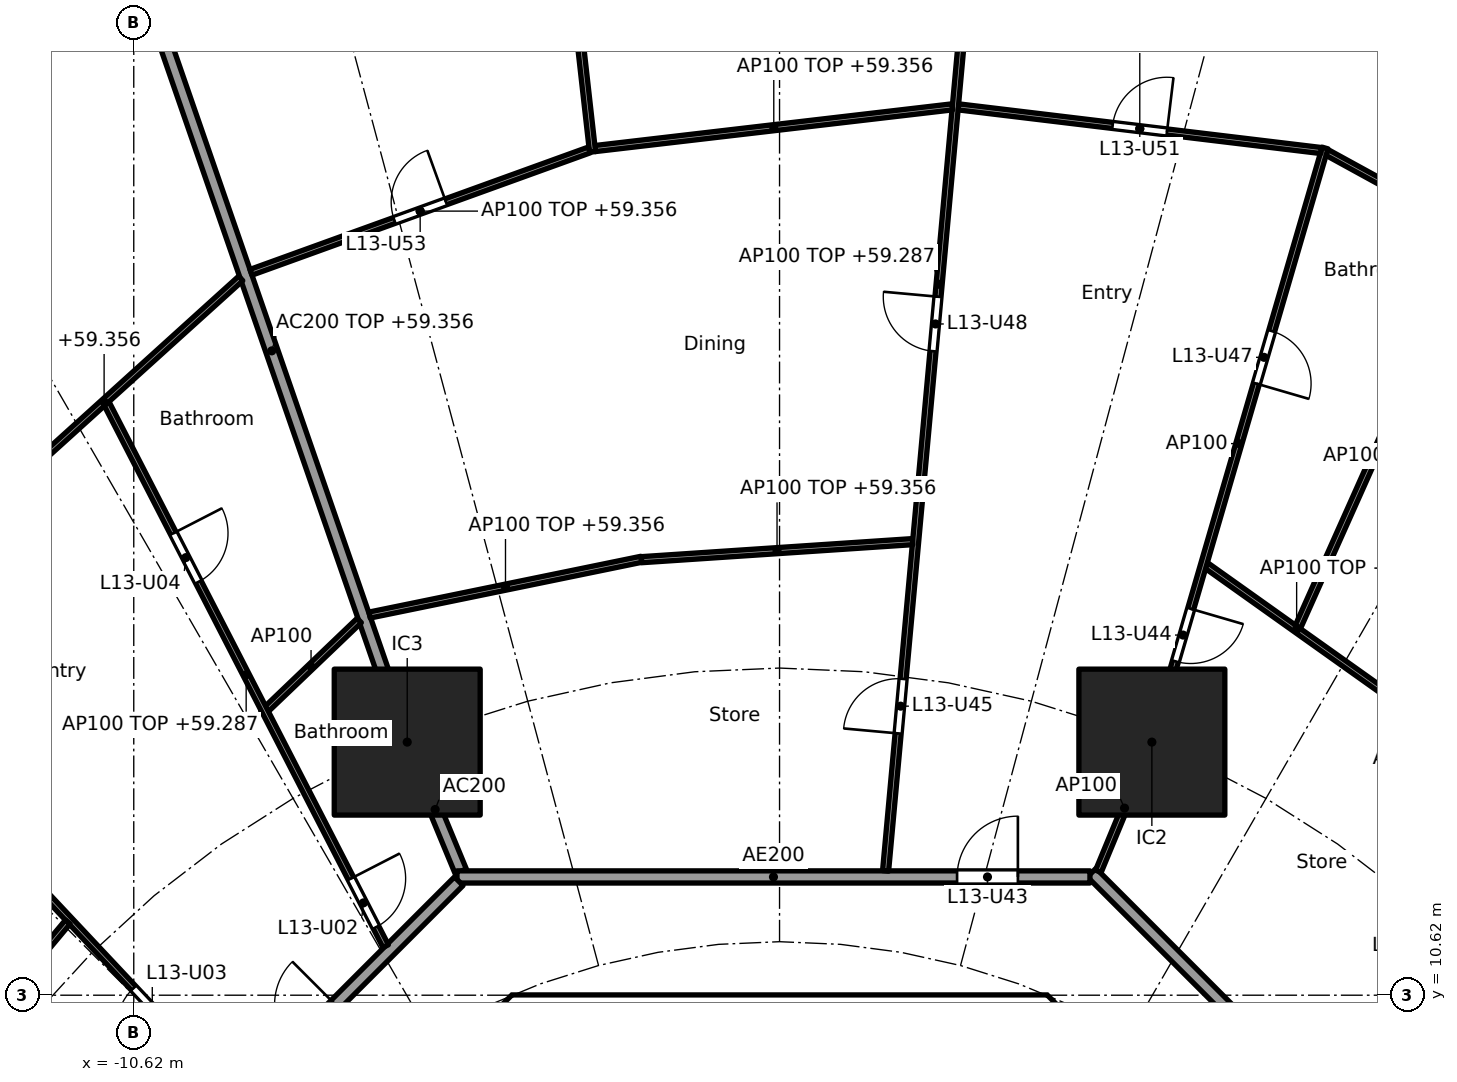
"""IFC4 building model, lengths in metres.
Left out: names, types, materials, properties, quantities, classifications, styles, units other than length and angle.
Written with IfcOpenShell. Run it as: python <this file> out.ifc"""

import sys

from ifc_helpers import new_model, si_unit, direction, frame, frame_2d, origin, origin_2d, place, context, subcontext, project, spatial, polyline, rectangle, outline, extrude, element, fill, save


model = new_model("IFC4")
c1 = context("Model", 3, precision=1e-05, world=origin(), true_north=direction((0.0, 1.0)))
c2 = subcontext(c1, "Body", "Model", "MODEL_VIEW")
j1 = project(units=[si_unit("LENGTHUNIT", "METRE"), si_unit("PLANEANGLEUNIT", "RADIAN")], contexts=[c1])
p1 = place(None, origin())
s1 = spatial("IfcSite", under=j1, at=p1, CompositionType="ELEMENT")
p2 = place(p1, origin())
s2 = spatial("IfcBuilding", under=s1, at=p2, CompositionType="ELEMENT")
p3 = place(p2, frame((0.0, 0.0, 56.6)))
s3 = spatial("IfcBuildingStorey", under=s2, at=p3, CompositionType="ELEMENT", Elevation=56.6)
for number, where, z_axis, x_axis in (
    (1, (6.123, 14.782, 0.0), (0.0, 0.0, 1.0), (1.0, 0.0, 0.0)),
    (2, (-6.123, 14.782, 0.0), (0.0, 0.0, 1.0), (1.0, 0.0, 0.0)),
):
    element("IfcColumn", number, at=place(p3, frame(where, z_axis=z_axis, x_axis=x_axis)), inside=s3, PredefinedType="COLUMN", context=c2, shape_type="SweptSolid", body=[
        extrude(rectangle(XDim=2.4, YDim=2.4, at=origin_2d()), origin(), (0.0, 0.0, 1.0), 3.7),
    ])
p4 = place(p3, origin())
e3 = element("IfcWall", 3, at=p4, inside=s3, PredefinedType="SHEAR", context=c2, shape_type="SweptSolid", body=[
    extrude(outline(polyline([(-4.152, 10.025), (-4.401, 9.776), (-4.825, 10.2), (-4.401, 10.625), (4.401, 10.625), (4.825, 10.2), (4.401, 9.776), (4.152, 10.025), (-4.152, 10.025)])), origin(), (0.0, 0.0, 1.0), 3.44),
])
p5 = place(p3, frame((-5.243, 12.657, 0.0), z_axis=(0.0, 0.0, 1.0), x_axis=(-0.382668627144, 0.923885664896, 0.0)))
e4 = element("IfcWall", 4, at=p5, inside=s3, PredefinedType="PARTITIONING", context=c2, shape_type="SweptSolid", body=[
    extrude(rectangle(XDim=2.2, YDim=0.2, at=frame_2d((1.1, 0.0))), origin(), (0.0, 0.0, 1.0), 3.44),
])
p6 = place(p3, frame((-6.139, 14.829, 0.0), z_axis=(0.0, 0.0, 1.0), x_axis=(-0.327178799566, 0.944962450637, 0.0)))
e5 = element("IfcWall", 5, at=p6, inside=s3, PredefinedType="PARTITIONING", context=c2, shape_type="SweptSolid", body=[
    extrude(rectangle(XDim=13.517, YDim=0.2, at=frame_2d((6.759, 0.0))), origin(), (0.0, 0.0, 1.0), 2.756),
])
p7 = place(p3, frame((12.635, 5.134, 0.0), z_axis=(0.0, 0.0, 1.0), x_axis=(-0.707106781187, 0.707106781187, 0.0)))
e6 = element("IfcWall", 6, at=p7, inside=s3, PredefinedType="PARTITIONING", context=c2, shape_type="SweptSolid", body=[
    extrude(rectangle(XDim=10.609, YDim=0.2, at=frame_2d((5.305, 0.0))), origin(), (0.0, 0.0, 1.0), 3.44),
])
p8 = place(p3, frame((5.104, 12.565, 0.0), z_axis=(0.0, 0.0, 1.0), x_axis=(-1.0, 0.0, 0.0)))
e7 = element("IfcWall", 7, at=p8, inside=s3, PredefinedType="PARTITIONING", context=c2, shape_type="SweptSolid", body=[
    extrude(rectangle(XDim=10.409, YDim=0.2, at=frame_2d((5.205, 0.0))), origin(), (0.0, 0.0, 1.0), 3.44),
])
p9 = place(p8, frame((1.185, 0.0, 0.0)))
e8 = element("IfcOpeningElement", 8, at=p9, cuts=e7, PredefinedType="OPENING", context=c2, shape_type="SweptSolid", body=[
    extrude(rectangle(XDim=1.0, YDim=2.1, at=frame_2d((0.5, 1.05))), frame((0.0, 0.11, 0.0), z_axis=(0.0, -1.0, 0.0), x_axis=(1.0, 0.0, 0.0)), (0.0, 0.0, 1.0), 0.22),
])
p10 = place(p3, frame((-5.275, 12.494, 0.0), z_axis=(0.0, 0.0, 1.0), x_axis=(-0.707106781187, -0.707106781187, 0.0)))
e9 = element("IfcWall", 9, at=p10, inside=s3, PredefinedType="PARTITIONING", context=c2, shape_type="SweptSolid", body=[
    extrude(rectangle(XDim=10.209, YDim=0.2, at=frame_2d((5.104, 0.0))), origin(), (0.0, 0.0, 1.0), 3.44),
])
p11 = place(p10, frame((2.87, 0.0, 0.0)))
e10 = element("IfcOpeningElement", 10, at=p11, cuts=e9, PredefinedType="OPENING", context=c2, shape_type="SweptSolid", body=[
    extrude(rectangle(XDim=1.0, YDim=2.1, at=frame_2d((0.5, 1.05))), frame((0.0, 0.11, 0.0), z_axis=(0.0, -1.0, 0.0), x_axis=(1.0, 0.0, 0.0)), (0.0, 0.0, 1.0), 0.22),
])
p12 = place(p3, frame((8.957, 8.953, 0.0), z_axis=(0.0, 0.0, 1.0), x_axis=(0.725250022034, 0.688485588476, 0.0)))
e11 = element("IfcWall", 11, at=p12, inside=s3, PredefinedType="PARTITIONING", context=c2, shape_type="SweptSolid", body=[
    extrude(rectangle(XDim=12.963, YDim=0.1, at=frame_2d((6.481, 0.0))), origin(), (0.0, 0.0, 1.0), 2.687),
])
p13 = place(p12, frame((2.333, 0.0, 0.0)))
e12 = element("IfcOpeningElement", 12, at=p13, cuts=e11, PredefinedType="OPENING", context=c2, shape_type="SweptSolid", body=[
    extrude(rectangle(XDim=0.9, YDim=2.1, at=frame_2d((0.45, 1.05))), frame((0.0, 0.06, 0.0), z_axis=(0.0, -1.0, 0.0), x_axis=(1.0, 0.0, 0.0)), (0.0, 0.0, 1.0), 0.12),
])
p14 = place(p12, frame((8.79, 0.0, 0.0)))
e13 = element("IfcOpeningElement", 13, at=p14, cuts=e11, PredefinedType="OPENING", context=c2, shape_type="SweptSolid", body=[
    extrude(rectangle(XDim=0.9, YDim=2.1, at=frame_2d((0.45, 1.05))), frame((0.0, 0.06, 0.0), z_axis=(0.0, -1.0, 0.0), x_axis=(1.0, 0.0, 0.0)), (0.0, 0.0, 1.0), 0.12),
])
p15 = place(p3, frame((9.989, 15.574, 0.0), z_axis=(0.0, 0.0, 1.0), x_axis=(-0.81494477814, 0.57953861699, 0.0)))
e14 = element("IfcWall", 14, at=p15, inside=s3, PredefinedType="PARTITIONING", context=c2, shape_type="SweptSolid", body=[
    extrude(rectangle(XDim=3.644, YDim=0.1, at=frame_2d((1.822, 0.0))), origin(), (0.0, 0.0, 1.0), 2.756),
])
p16 = place(p3, frame((13.855, 21.818, 0.0), z_axis=(0.0, 0.0, 1.0), x_axis=(-0.876794415294, 0.480865421203, 0.0)))
e15 = element("IfcWall", 15, at=p16, inside=s3, PredefinedType="PARTITIONING", context=c2, shape_type="SweptSolid", body=[
    extrude(rectangle(XDim=5.536, YDim=0.1, at=frame_2d((2.768, 0.0))), origin(), (0.0, 0.0, 1.0), 2.756),
])
p17 = place(p16, frame((0.934, 0.0, 0.0)))
e16 = element("IfcOpeningElement", 16, at=p17, cuts=e15, PredefinedType="OPENING", context=c2, shape_type="SweptSolid", body=[
    extrude(rectangle(XDim=0.9, YDim=2.1, at=frame_2d((0.45, 1.05))), frame((0.0, 0.06, 0.0), z_axis=(0.0, -1.0, 0.0), x_axis=(1.0, 0.0, 0.0)), (0.0, 0.0, 1.0), 0.12),
])
p18 = place(p3, frame((8.524, 16.676, 0.0), z_axis=(0.0, 0.0, 1.0), x_axis=(0.408065177262, 0.912952797852, 0.0)))
e17 = element("IfcWall", 17, at=p18, inside=s3, PredefinedType="PARTITIONING", context=c2, shape_type="SweptSolid", body=[
    extrude(rectangle(XDim=15.089, YDim=0.1, at=frame_2d((7.544, 0.0))), origin(), (0.0, 0.0, 1.0), 2.837),
])
p19 = place(p3, frame((5.243, 12.657, 0.0), z_axis=(0.0, 0.0, 1.0), x_axis=(0.382719158442, 0.923864733477, 0.0)))
e18 = element("IfcWall", 18, at=p19, inside=s3, PredefinedType="PARTITIONING", context=c2, shape_type="SweptSolid", body=[
    extrude(rectangle(XDim=2.25, YDim=0.1, at=frame_2d((1.125, 0.0))), origin(), (0.0, 0.0, 1.0), 3.44),
])
p20 = place(p3, frame((6.137, 14.83, 0.0), z_axis=(0.0, 0.0, 1.0), x_axis=(0.279843546189, 0.960045618529, 0.0)))
e19 = element("IfcWall", 19, at=p20, inside=s3, PredefinedType="PARTITIONING", context=c2, shape_type="SweptSolid", body=[
    extrude(rectangle(XDim=10.127, YDim=0.1, at=frame_2d((5.063, 0.0))), origin(), (0.0, 0.0, 1.0), 3.44),
])
p21 = place(p20, frame((1.334, 0.0, 0.0)))
e20 = element("IfcOpeningElement", 20, at=p21, cuts=e19, PredefinedType="OPENING", context=c2, shape_type="SweptSolid", body=[
    extrude(rectangle(XDim=0.9, YDim=2.1, at=frame_2d((0.45, 1.05))), frame((0.0, 0.06, 0.0), z_axis=(0.0, -1.0, 0.0), x_axis=(1.0, 0.0, 0.0)), (0.0, 0.0, 1.0), 0.12),
])
p22 = place(p20, frame((6.091, 0.0, 0.0)))
e21 = element("IfcOpeningElement", 21, at=p22, cuts=e19, PredefinedType="OPENING", context=c2, shape_type="SweptSolid", body=[
    extrude(rectangle(XDim=0.9, YDim=2.1, at=frame_2d((0.45, 1.05))), frame((0.0, 0.06, 0.0), z_axis=(0.0, -1.0, 0.0), x_axis=(1.0, 0.0, 0.0)), (0.0, 0.0, 1.0), 0.12),
])
p23 = place(p3, frame((8.907, 24.51, 0.0), z_axis=(0.0, 0.0, 1.0), x_axis=(-0.992836798252, 0.119478416615, 0.0)))
e22 = element("IfcWall", 22, at=p23, inside=s3, PredefinedType="PARTITIONING", context=c2, shape_type="SweptSolid", body=[
    extrude(rectangle(XDim=6.01, YDim=0.1, at=frame_2d((3.005, 0.0))), origin(), (0.0, 0.0, 1.0), 2.756),
])
p24 = place(p23, frame((2.555, 0.0, 0.0)))
e23 = element("IfcOpeningElement", 23, at=p24, cuts=e22, PredefinedType="OPENING", context=c2, shape_type="SweptSolid", body=[
    extrude(rectangle(XDim=0.9, YDim=2.1, at=frame_2d((0.45, 1.05))), frame((0.0, 0.06, 0.0), z_axis=(0.0, -1.0, 0.0), x_axis=(1.0, 0.0, 0.0)), (0.0, 0.0, 1.0), 0.12),
])
p25 = place(p3, frame((1.744, 12.664, 0.0), z_axis=(0.0, 0.0, 1.0), x_axis=(0.090893639596, 0.995860605849, 0.0)))
e24 = element("IfcWall", 24, at=p25, inside=s3, PredefinedType="PARTITIONING", context=c2, shape_type="SweptSolid", body=[
    extrude(rectangle(XDim=19.374, YDim=0.1, at=frame_2d((9.687, 0.0))), origin(), (0.0, 0.0, 1.0), 2.687),
])
p26 = place(p25, frame((2.27, 0.0, 0.0)))
e25 = element("IfcOpeningElement", 25, at=p26, cuts=e24, PredefinedType="OPENING", context=c2, shape_type="SweptSolid", body=[
    extrude(rectangle(XDim=0.9, YDim=2.1, at=frame_2d((0.45, 1.05))), frame((0.0, 0.06, 0.0), z_axis=(0.0, -1.0, 0.0), x_axis=(1.0, 0.0, 0.0)), (0.0, 0.0, 1.0), 0.12),
])
p27 = place(p25, frame((8.582, 0.0, 0.0)))
e26 = element("IfcOpeningElement", 26, at=p27, cuts=e24, PredefinedType="OPENING", context=c2, shape_type="SweptSolid", body=[
    extrude(rectangle(XDim=0.9, YDim=2.1, at=frame_2d((0.45, 1.05))), frame((0.0, 0.06, 0.0), z_axis=(0.0, -1.0, 0.0), x_axis=(1.0, 0.0, 0.0)), (0.0, 0.0, 1.0), 0.12),
])
p28 = place(p25, frame((15.548, 0.0, 0.0)))
e27 = element("IfcOpeningElement", 27, at=p28, cuts=e24, PredefinedType="OPENING", context=c2, shape_type="SweptSolid", body=[
    extrude(rectangle(XDim=0.9, YDim=2.1, at=frame_2d((0.45, 1.05))), frame((0.0, 0.06, 0.0), z_axis=(0.0, -1.0, 0.0), x_axis=(1.0, 0.0, 0.0)), (0.0, 0.0, 1.0), 0.12),
])
p29 = place(p3, frame((2.188, 18.079, 0.0), z_axis=(0.0, 0.0, 1.0), x_axis=(-0.997791437766, -0.066424744789, 0.0)))
e28 = element("IfcWall", 28, at=p29, inside=s3, PredefinedType="PARTITIONING", context=c2, shape_type="SweptSolid", body=[
    extrude(rectangle(XDim=4.469, YDim=0.1, at=frame_2d((2.235, 0.0))), origin(), (0.0, 0.0, 1.0), 2.756),
])
p30 = place(p3, frame((2.842, 25.229, 0.0), z_axis=(0.0, 0.0, 1.0), x_axis=(-0.993255612046, -0.115945198862, 0.0)))
e29 = element("IfcWall", 29, at=p30, inside=s3, PredefinedType="PARTITIONING", context=c2, shape_type="SweptSolid", body=[
    extrude(rectangle(XDim=5.913, YDim=0.1, at=frame_2d((2.956, 0.0))), origin(), (0.0, 0.0, 1.0), 2.756),
])
p31 = place(p3, frame((-2.272, 17.789, 0.0), z_axis=(0.0, 0.0, 1.0), x_axis=(-0.979595137747, -0.200981009307, 0.0)))
e30 = element("IfcWall", 30, at=p31, inside=s3, PredefinedType="PARTITIONING", context=c2, shape_type="SweptSolid", body=[
    extrude(rectangle(XDim=4.562, YDim=0.1, at=frame_2d((2.281, 0.0))), origin(), (0.0, 0.0, 1.0), 2.756),
])
p32 = place(p3, frame((-3.075, 24.488, 0.0), z_axis=(0.0, 0.0, 1.0), x_axis=(-0.111705235978, 0.993741384997, 0.0)))
e31 = element("IfcWall", 31, at=p32, inside=s3, PredefinedType="PARTITIONING", context=c2, shape_type="SweptSolid", body=[
    extrude(rectangle(XDim=6.395, YDim=0.1, at=frame_2d((3.198, 0.0))), origin(), (0.0, 0.0, 1.0), 2.756),
])
p33 = place(p3, frame((-3.128, 24.521, 0.0), z_axis=(0.0, 0.0, 1.0), x_axis=(-0.940401494588, -0.340066212636, 0.0)))
e32 = element("IfcWall", 32, at=p33, inside=s3, PredefinedType="PARTITIONING", context=c2, shape_type="SweptSolid", body=[
    extrude(rectangle(XDim=5.917, YDim=0.1, at=frame_2d((2.958, 0.0))), origin(), (0.0, 0.0, 1.0), 2.756),
])
p34 = place(p33, frame((2.509, 0.0, 0.0)))
e33 = element("IfcOpeningElement", 33, at=p34, cuts=e32, PredefinedType="OPENING", context=c2, shape_type="SweptSolid", body=[
    extrude(rectangle(XDim=0.9, YDim=2.1, at=frame_2d((0.45, 1.05))), frame((0.0, 0.06, 0.0), z_axis=(0.0, -1.0, 0.0), x_axis=(1.0, 0.0, 0.0)), (0.0, 0.0, 1.0), 0.12),
])
p35 = place(p3, frame((-6.912, 16.782, 0.0), z_axis=(0.0, 0.0, 1.0), x_axis=(-0.722789289931, -0.691068478778, 0.0)))
e34 = element("IfcWall", 34, at=p35, inside=s3, PredefinedType="PARTITIONING", context=c2, shape_type="SweptSolid", body=[
    extrude(rectangle(XDim=2.194, YDim=0.1, at=frame_2d((1.097, 0.0))), origin(), (0.0, 0.0, 1.0), 3.44),
])
p36 = place(p3, frame((-8.861, 22.407, 0.0), z_axis=(0.0, 0.0, 1.0), x_axis=(-0.741713303551, -0.670717060567, 0.0)))
e35 = element("IfcWall", 35, at=p36, inside=s3, PredefinedType="PARTITIONING", context=c2, shape_type="SweptSolid", body=[
    extrude(rectangle(XDim=6.059, YDim=0.1, at=frame_2d((3.03, 0.0))), origin(), (0.0, 0.0, 1.0), 2.756),
])
p37 = place(p3, frame((-6.477, 11.427, 0.0), z_axis=(0.0, 0.0, 1.0), x_axis=(-0.457464037982, 0.889228122561, 0.0)))
e36 = element("IfcWall", 36, at=p37, inside=s3, PredefinedType="PARTITIONING", context=c2, shape_type="SweptSolid", body=[
    extrude(rectangle(XDim=10.032, YDim=0.1, at=frame_2d((5.016, 0.0))), origin(), (0.0, 0.0, 1.0), 2.687),
])
p38 = place(p37, frame((0.35, 0.0, 0.0)))
e37 = element("IfcOpeningElement", 37, at=p38, cuts=e36, PredefinedType="OPENING", context=c2, shape_type="SweptSolid", body=[
    extrude(rectangle(XDim=0.9, YDim=2.1, at=frame_2d((0.45, 1.05))), frame((0.0, 0.06, 0.0), z_axis=(0.0, -1.0, 0.0), x_axis=(1.0, 0.0, 0.0)), (0.0, 0.0, 1.0), 0.12),
])
p39 = place(p37, frame((6.735, 0.0, 0.0)))
e38 = element("IfcOpeningElement", 38, at=p39, cuts=e36, PredefinedType="OPENING", context=c2, shape_type="SweptSolid", body=[
    extrude(rectangle(XDim=0.9, YDim=2.1, at=frame_2d((0.45, 1.05))), frame((0.0, 0.06, 0.0), z_axis=(0.0, -1.0, 0.0), x_axis=(1.0, 0.0, 0.0)), (0.0, 0.0, 1.0), 0.12),
])
p40 = place(p3, frame((-8.953, 8.958, 0.0), z_axis=(0.0, 0.0, 1.0), x_axis=(-0.684574307023, 0.728943082939, 0.0)))
e39 = element("IfcWall", 39, at=p40, inside=s3, PredefinedType="PARTITIONING", context=c2, shape_type="SweptSolid", body=[
    extrude(rectangle(XDim=15.231, YDim=0.1, at=frame_2d((7.615, 0.0))), origin(), (0.0, 0.0, 1.0), 2.687),
])
p41 = place(p40, frame((1.54, 0.0, 0.0)))
e40 = element("IfcOpeningElement", 40, at=p41, cuts=e39, PredefinedType="OPENING", context=c2, shape_type="SweptSolid", body=[
    extrude(rectangle(XDim=0.9, YDim=2.1, at=frame_2d((0.45, 1.05))), frame((0.0, 0.06, 0.0), z_axis=(0.0, -1.0, 0.0), x_axis=(1.0, 0.0, 0.0)), (0.0, 0.0, 1.0), 0.12),
])
p42 = place(p40, frame((6.174, 0.0, 0.0)))
e41 = element("IfcOpeningElement", 41, at=p42, cuts=e39, PredefinedType="OPENING", context=c2, shape_type="SweptSolid", body=[
    extrude(rectangle(XDim=0.9, YDim=2.1, at=frame_2d((0.45, 1.05))), frame((0.0, 0.06, 0.0), z_axis=(0.0, -1.0, 0.0), x_axis=(1.0, 0.0, 0.0)), (0.0, 0.0, 1.0), 0.12),
])
p43 = place(p40, frame((11.8, 0.0, 0.0)))
e42 = element("IfcOpeningElement", 42, at=p43, cuts=e39, PredefinedType="OPENING", context=c2, shape_type="SweptSolid", body=[
    extrude(rectangle(XDim=0.9, YDim=2.1, at=frame_2d((0.45, 1.05))), frame((0.0, 0.06, 0.0), z_axis=(0.0, -1.0, 0.0), x_axis=(1.0, 0.0, 0.0)), (0.0, 0.0, 1.0), 0.12),
])
p44 = place(p3, frame((-11.705, 11.825, 0.0), z_axis=(0.0, 0.0, 1.0), x_axis=(-0.640861724905, -0.767656335577, 0.0)))
e43 = element("IfcWall", 43, at=p44, inside=s3, PredefinedType="PARTITIONING", context=c2, shape_type="SweptSolid", body=[
    extrude(rectangle(XDim=2.268, YDim=0.1, at=frame_2d((1.134, 0.0))), origin(), (0.0, 0.0, 1.0), 2.756),
])
p45 = place(p38, frame((0.9, 0.0, 0.0), x_axis=(-1.0, 0.0, 0.0)))
e44 = element("IfcDoor", 44, at=p45, inside=s3, OperationType="SINGLE_SWING_LEFT", PredefinedType="DOOR", context=c2, shape_type="SweptSolid", body=[
    extrude(rectangle(XDim=0.9, YDim=2.1, at=frame_2d((0.45, 1.05))), frame((0.0, 0.025, 0.0), z_axis=(0.0, -1.0, 0.0), x_axis=(1.0, 0.0, 0.0)), (0.0, 0.0, 1.0), 0.05),
])
fill(e37, e44)
p46 = place(p41, origin())
e45 = element("IfcDoor", 45, at=p46, inside=s3, OperationType="SINGLE_SWING_LEFT", PredefinedType="DOOR", context=c2, shape_type="SweptSolid", body=[
    extrude(rectangle(XDim=0.9, YDim=2.1, at=frame_2d((0.45, 1.05))), frame((0.0, 0.025, 0.0), z_axis=(0.0, -1.0, 0.0), x_axis=(1.0, 0.0, 0.0)), (0.0, 0.0, 1.0), 0.05),
])
fill(e40, e45)
p47 = place(p39, frame((0.9, 0.0, 0.0), x_axis=(-1.0, 0.0, 0.0)))
e46 = element("IfcDoor", 46, at=p47, inside=s3, OperationType="SINGLE_SWING_LEFT", PredefinedType="DOOR", context=c2, shape_type="SweptSolid", body=[
    extrude(rectangle(XDim=0.9, YDim=2.1, at=frame_2d((0.45, 1.05))), frame((0.0, 0.025, 0.0), z_axis=(0.0, -1.0, 0.0), x_axis=(1.0, 0.0, 0.0)), (0.0, 0.0, 1.0), 0.05),
])
fill(e38, e46)
p48 = place(p9, frame((1.0, 0.0, 0.0), x_axis=(-1.0, 0.0, 0.0)))
e47 = element("IfcDoor", 47, at=p48, inside=s3, OperationType="SINGLE_SWING_RIGHT", PredefinedType="DOOR", context=c2, shape_type="SweptSolid", body=[
    extrude(rectangle(XDim=1.0, YDim=2.1, at=frame_2d((0.5, 1.05))), frame((0.0, 0.025, 0.0), z_axis=(0.0, -1.0, 0.0), x_axis=(1.0, 0.0, 0.0)), (0.0, 0.0, 1.0), 0.05),
])
fill(e8, e47)
p49 = place(p21, frame((0.9, 0.0, 0.0), x_axis=(-1.0, 0.0, 0.0)))
e48 = element("IfcDoor", 48, at=p49, inside=s3, OperationType="SINGLE_SWING_LEFT", PredefinedType="DOOR", context=c2, shape_type="SweptSolid", body=[
    extrude(rectangle(XDim=0.9, YDim=2.1, at=frame_2d((0.45, 1.05))), frame((0.0, 0.025, 0.0), z_axis=(0.0, -1.0, 0.0), x_axis=(1.0, 0.0, 0.0)), (0.0, 0.0, 1.0), 0.05),
])
fill(e20, e48)
p50 = place(p26, origin())
e49 = element("IfcDoor", 49, at=p50, inside=s3, OperationType="SINGLE_SWING_LEFT", PredefinedType="DOOR", context=c2, shape_type="SweptSolid", body=[
    extrude(rectangle(XDim=0.9, YDim=2.1, at=frame_2d((0.45, 1.05))), frame((0.0, 0.025, 0.0), z_axis=(0.0, -1.0, 0.0), x_axis=(1.0, 0.0, 0.0)), (0.0, 0.0, 1.0), 0.05),
])
fill(e25, e49)
p51 = place(p22, frame((0.9, 0.0, 0.0), x_axis=(-1.0, 0.0, 0.0)))
e50 = element("IfcDoor", 50, at=p51, inside=s3, OperationType="SINGLE_SWING_RIGHT", PredefinedType="DOOR", context=c2, shape_type="SweptSolid", body=[
    extrude(rectangle(XDim=0.9, YDim=2.1, at=frame_2d((0.45, 1.05))), frame((0.0, 0.025, 0.0), z_axis=(0.0, -1.0, 0.0), x_axis=(1.0, 0.0, 0.0)), (0.0, 0.0, 1.0), 0.05),
])
fill(e21, e50)
p52 = place(p27, origin())
e51 = element("IfcDoor", 51, at=p52, inside=s3, OperationType="SINGLE_SWING_RIGHT", PredefinedType="DOOR", context=c2, shape_type="SweptSolid", body=[
    extrude(rectangle(XDim=0.9, YDim=2.1, at=frame_2d((0.45, 1.05))), frame((0.0, 0.025, 0.0), z_axis=(0.0, -1.0, 0.0), x_axis=(1.0, 0.0, 0.0)), (0.0, 0.0, 1.0), 0.05),
])
fill(e26, e51)
p53 = place(p24, frame((0.9, 0.0, 0.0), x_axis=(-1.0, 0.0, 0.0)))
e52 = element("IfcDoor", 52, at=p53, inside=s3, OperationType="SINGLE_SWING_RIGHT", PredefinedType="DOOR", context=c2, shape_type="SweptSolid", body=[
    extrude(rectangle(XDim=0.9, YDim=2.1, at=frame_2d((0.45, 1.05))), frame((0.0, 0.025, 0.0), z_axis=(0.0, -1.0, 0.0), x_axis=(1.0, 0.0, 0.0)), (0.0, 0.0, 1.0), 0.05),
])
fill(e23, e52)
p54 = place(p34, frame((0.9, 0.0, 0.0), x_axis=(-1.0, 0.0, 0.0)))
e53 = element("IfcDoor", 53, at=p54, inside=s3, OperationType="SINGLE_SWING_RIGHT", PredefinedType="DOOR", context=c2, shape_type="SweptSolid", body=[
    extrude(rectangle(XDim=0.9, YDim=2.1, at=frame_2d((0.45, 1.05))), frame((0.0, 0.025, 0.0), z_axis=(0.0, -1.0, 0.0), x_axis=(1.0, 0.0, 0.0)), (0.0, 0.0, 1.0), 0.05),
])
fill(e33, e53)
save(model, sys.argv[1])
